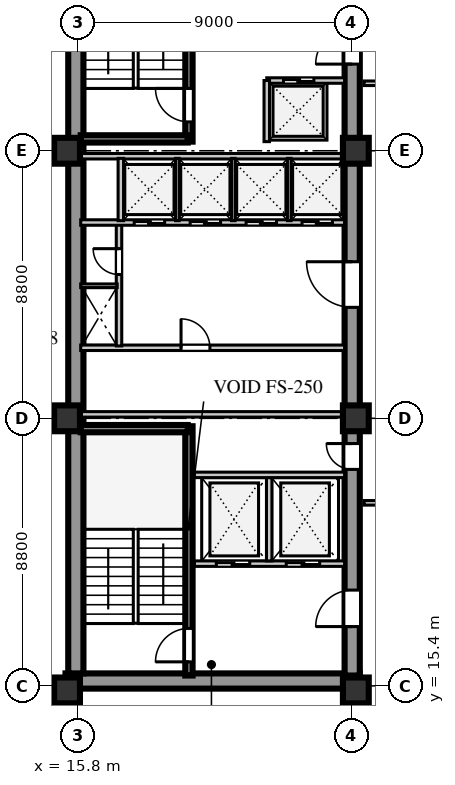
"""IFC4 building model, lengths in metres.
Left out: names, types, materials, properties, quantities, classifications, styles, units other than length and angle.
Written with IfcOpenShell. Run it as: python <this file> out.ifc"""

import sys

from ifc_helpers import new_model, si_unit, direction, frame, frame_2d, origin, origin_2d, place, context, subcontext, project, spatial, rectangle, extrude, element, fill, save


model = new_model("IFC4")
c1 = context("Model", 3, precision=1e-05, world=origin(), true_north=direction((0.0, 1.0)))
c2 = subcontext(c1, "Body", "Model", "MODEL_VIEW")
j1 = project(units=[si_unit("LENGTHUNIT", "METRE"), si_unit("PLANEANGLEUNIT", "RADIAN")], contexts=[c1])
p1 = place(None, origin())
s1 = spatial("IfcSite", under=j1, at=p1, CompositionType="ELEMENT")
p2 = place(p1, origin())
s2 = spatial("IfcBuilding", under=s1, at=p2, CompositionType="ELEMENT")
p3 = place(p2, frame((0.0, 0.0, 196.4)))
s3 = spatial("IfcBuildingStorey", under=s2, at=p3, CompositionType="ELEMENT", Elevation=196.4)
p4 = place(p3, frame((15.4, 15.56, 0.0), z_axis=(0.0, 0.0, 1.0), x_axis=(1.0, 0.0, 0.0)))
e1 = element("IfcWall", 1, at=p4, inside=s3, PredefinedType="SHEAR", context=c2, shape_type="SweptSolid", body=[
    extrude(rectangle(XDim=9.68, YDim=0.5, at=frame_2d((4.84, 0.0))), origin(), (0.0, 0.0, 1.0), 3.6),
])
p5 = place(p3, frame((15.74, 15.81, 0.0), z_axis=(0.0, 0.0, 1.0), x_axis=(0.0, 1.0, 0.0)))
e2 = element("IfcWall", 2, at=p5, inside=s3, PredefinedType="SHEAR", context=c2, shape_type="SweptSolid", body=[
    extrude(rectangle(XDim=25.63, YDim=0.5, at=frame_2d((12.815, 0.0))), origin(), (0.0, 0.0, 1.0), 3.6),
])
p6 = place(p3, frame((24.83, 15.74, 0.0), z_axis=(0.0, 0.0, 1.0), x_axis=(0.0, 1.0, 0.0)))
e3 = element("IfcWall", 3, at=p6, inside=s3, PredefinedType="SHEAR", context=c2, shape_type="SweptSolid", body=[
    extrude(rectangle(XDim=25.76, YDim=0.5, at=frame_2d((12.88, 0.0))), origin(), (0.0, 0.0, 1.0), 3.6),
])
p7 = place(p6, frame((1.61, 0.0, 0.0)))
e4 = element("IfcOpeningElement", 4, at=p7, cuts=e3, PredefinedType="OPENING", context=c2, shape_type="SweptSolid", body=[
    extrude(rectangle(XDim=1.2, YDim=2.1, at=frame_2d((0.6, 1.05))), frame((0.0, 0.26, 0.0), z_axis=(0.0, -1.0, 0.0), x_axis=(1.0, 0.0, 0.0)), (0.0, 0.0, 1.0), 0.52),
])
p8 = place(p6, frame((6.78, 0.0, 0.0)))
e5 = element("IfcOpeningElement", 5, at=p8, cuts=e3, PredefinedType="OPENING", context=c2, shape_type="SweptSolid", body=[
    extrude(rectangle(XDim=0.85, YDim=2.06, at=frame_2d((0.425, 1.03))), frame((0.0, 0.26, 0.0), z_axis=(0.0, -1.0, 0.0), x_axis=(1.0, 0.0, 0.0)), (0.0, 0.0, 1.0), 0.52),
])
p9 = place(p6, frame((12.11, 0.0, 0.0)))
e6 = element("IfcOpeningElement", 6, at=p9, cuts=e3, PredefinedType="OPENING", context=c2, shape_type="SweptSolid", body=[
    extrude(rectangle(XDim=1.5, YDim=2.12, at=frame_2d((0.75, 1.06))), frame((0.0, 0.26, 0.0), z_axis=(0.0, -1.0, 0.0), x_axis=(1.0, 0.0, 0.0)), (0.0, 0.0, 1.0), 0.52),
])
p10 = place(p6, frame((20.11, 0.0, 0.0)))
e7 = element("IfcOpeningElement", 7, at=p10, cuts=e3, PredefinedType="OPENING", context=c2, shape_type="SweptSolid", body=[
    extrude(rectangle(XDim=1.2, YDim=2.12, at=frame_2d((0.6, 1.06))), frame((0.0, 0.26, 0.0), z_axis=(0.0, -1.0, 0.0), x_axis=(1.0, 0.0, 0.0)), (0.0, 0.0, 1.0), 0.52),
])
p11 = place(p6, frame((24.01, 0.0, 0.0)))
e8 = element("IfcOpeningElement", 8, at=p11, cuts=e3, PredefinedType="OPENING", context=c2, shape_type="SweptSolid", body=[
    extrude(rectangle(XDim=0.95, YDim=2.1, at=frame_2d((0.475, 1.05))), frame((0.0, 0.26, 0.0), z_axis=(0.0, -1.0, 0.0), x_axis=(1.0, 0.0, 0.0)), (0.0, 0.0, 1.0), 0.52),
])
for number, where, z_axis, x_axis in (
    (9, (15.45, 15.25, 0.0), (0.0, 0.0, 1.0), (1.0, 0.0, 0.0)),
    (10, (15.45, 24.2, 0.0), (0.0, 0.0, 1.0), (1.0, 0.0, 0.0)),
    (11, (15.45, 33.0, 0.0), (0.0, 0.0, 1.0), (1.0, 0.0, 0.0)),
    (12, (24.95, 15.25, 0.0), (0.0, 0.0, 1.0), (1.0, 0.0, 0.0)),
    (13, (24.95, 24.2, 0.0), (0.0, 0.0, 1.0), (1.0, 0.0, 0.0)),
    (14, (24.95, 33.0, 0.0), (0.0, 0.0, 1.0), (1.0, 0.0, 0.0)),
):
    element("IfcColumn", number, at=place(p3, frame(where, z_axis=z_axis, x_axis=x_axis)), inside=s3, PredefinedType="COLUMN", context=c2, shape_type="SweptSolid", body=[
        extrude(rectangle(XDim=0.85, YDim=0.85, at=origin_2d()), origin(), (0.0, 0.0, 1.0), 3.6),
    ])
p12 = place(p3, frame((19.46, 15.74, 0.0), z_axis=(0.0, 0.0, 1.0), x_axis=(0.0, 1.0, 0.0)))
e15 = element("IfcWall", 15, at=p12, inside=s3, PredefinedType="SHEAR", context=c2, shape_type="SweptSolid", body=[
    extrude(rectangle(XDim=8.2, YDim=0.24, at=frame_2d((4.1, 0.0))), origin(), (0.0, 0.0, 1.0), 3.85),
])
p13 = place(p12, frame((0.45, 0.0, 0.0)))
e16 = element("IfcOpeningElement", 16, at=p13, cuts=e15, PredefinedType="OPENING", context=c2, shape_type="SweptSolid", body=[
    extrude(rectangle(XDim=1.1, YDim=2.1, at=frame_2d((0.55, 1.05))), frame((0.0, 0.13, 0.0), z_axis=(0.0, -1.0, 0.0), x_axis=(1.0, 0.0, 0.0)), (0.0, 0.0, 1.0), 0.26),
])
p14 = place(p3, frame((15.9, 23.86, 0.0), z_axis=(0.0, 0.0, 1.0), x_axis=(1.0, 0.0, 0.0)))
e17 = element("IfcWall", 17, at=p14, inside=s3, PredefinedType="SHEAR", context=c2, shape_type="SweptSolid", body=[
    extrude(rectangle(XDim=3.52, YDim=0.24, at=frame_2d((1.76, 0.0))), origin(), (0.0, 0.0, 1.0), 3.85),
])
p15 = place(p3, frame((19.64, 19.42, 0.0), z_axis=(0.0, 0.0, 1.0), x_axis=(1.0, 0.0, 0.0)))
e18 = element("IfcWall", 18, at=p15, inside=s3, PredefinedType="SOLIDWALL", context=c2, shape_type="SweptSolid", body=[
    extrude(rectangle(XDim=4.94, YDim=0.18, at=frame_2d((2.47, 0.0))), origin(), (0.0, 0.0, 1.0), 3.6),
])
p16 = place(p15, frame((0.72, 0.0, 0.0)))
e19 = element("IfcOpeningElement", 19, at=p16, cuts=e18, PredefinedType="OPENING", context=c2, shape_type="SweptSolid", body=[
    extrude(rectangle(XDim=1.1, YDim=2.1, at=frame_2d((0.55, 1.05))), frame((0.0, 0.1, 0.0), z_axis=(0.0, -1.0, 0.0), x_axis=(1.0, 0.0, 0.0)), (0.0, 0.0, 1.0), 0.2),
])
p17 = place(p15, frame((3.02, 0.0, 0.0)))
e20 = element("IfcOpeningElement", 20, at=p17, cuts=e18, PredefinedType="OPENING", context=c2, shape_type="SweptSolid", body=[
    extrude(rectangle(XDim=1.1, YDim=2.1, at=frame_2d((0.55, 1.05))), frame((0.0, 0.1, 0.0), z_axis=(0.0, -1.0, 0.0), x_axis=(1.0, 0.0, 0.0)), (0.0, 0.0, 1.0), 0.2),
])
p18 = place(p3, frame((22.1, 19.51, 0.0), z_axis=(0.0, 0.0, 1.0), x_axis=(0.0, 1.0, 0.0)))
e21 = element("IfcWall", 21, at=p18, inside=s3, PredefinedType="SOLIDWALL", context=c2, shape_type="SweptSolid", body=[
    extrude(rectangle(XDim=2.74, YDim=0.18, at=frame_2d((1.37, 0.0))), origin(), (0.0, 0.0, 1.0), 3.6),
])
p19 = place(p3, frame((19.64, 22.34, 0.0), z_axis=(0.0, 0.0, 1.0), x_axis=(1.0, 0.0, 0.0)))
e22 = element("IfcWall", 22, at=p19, inside=s3, PredefinedType="SOLIDWALL", context=c2, shape_type="SweptSolid", body=[
    extrude(rectangle(XDim=4.94, YDim=0.18, at=frame_2d((2.47, 0.0))), origin(), (0.0, 0.0, 1.0), 3.6),
])
p20 = place(p3, frame((15.9, 26.52, 0.0), z_axis=(0.0, 0.0, 1.0), x_axis=(1.0, 0.0, 0.0)))
e23 = element("IfcWall", 23, at=p20, inside=s3, PredefinedType="SOLIDWALL", context=c2, shape_type="SweptSolid", body=[
    extrude(rectangle(XDim=8.68, YDim=0.18, at=frame_2d((4.34, 0.0))), origin(), (0.0, 0.0, 1.0), 3.6),
])
p21 = place(p20, frame((3.3, 0.0, 0.0)))
e24 = element("IfcOpeningElement", 24, at=p21, cuts=e23, PredefinedType="OPENING", context=c2, shape_type="SweptSolid", body=[
    extrude(rectangle(XDim=0.95, YDim=2.1, at=frame_2d((0.475, 1.05))), frame((0.0, 0.1, 0.0), z_axis=(0.0, -1.0, 0.0), x_axis=(1.0, 0.0, 0.0)), (0.0, 0.0, 1.0), 0.2),
])
p22 = place(p3, frame((15.9, 24.33, 0.0), z_axis=(0.0, 0.0, 1.0), x_axis=(1.0, 0.0, 0.0)))
e25 = element("IfcWall", 25, at=p22, inside=s3, PredefinedType="SOLIDWALL", context=c2, shape_type="SweptSolid", body=[
    extrude(rectangle(XDim=8.68, YDim=0.18, at=frame_2d((4.34, 0.0))), origin(), (0.0, 0.0, 1.0), 2.95),
])
p23 = place(p3, frame((17.16, 26.58, 0.0), z_axis=(0.0, 0.0, 1.0), x_axis=(0.0, 1.0, 0.0)))
e26 = element("IfcWall", 26, at=p23, inside=s3, PredefinedType="SOLIDWALL", context=c2, shape_type="SweptSolid", body=[
    extrude(rectangle(XDim=4.02, YDim=0.18, at=frame_2d((2.01, 0.0))), origin(), (0.0, 0.0, 1.0), 3.6),
])
p24 = place(p23, frame((2.35, 0.0, 0.0)))
e27 = element("IfcOpeningElement", 27, at=p24, cuts=e26, PredefinedType="OPENING", context=c2, shape_type="SweptSolid", body=[
    extrude(rectangle(XDim=0.85, YDim=2.06, at=frame_2d((0.425, 1.03))), frame((0.0, 0.1, 0.0), z_axis=(0.0, -1.0, 0.0), x_axis=(1.0, 0.0, 0.0)), (0.0, 0.0, 1.0), 0.2),
])
p25 = place(p3, frame((15.9, 28.56, 0.0), z_axis=(0.0, 0.0, 1.0), x_axis=(1.0, 0.0, 0.0)))
e28 = element("IfcWall", 28, at=p25, inside=s3, PredefinedType="PARTITIONING", context=c2, shape_type="SweptSolid", body=[
    extrude(rectangle(XDim=1.2, YDim=0.12, at=frame_2d((0.6, 0.0))), origin(), (0.0, 0.0, 1.0), 3.6),
])
p26 = place(p3, frame((15.9, 30.64, 0.0), z_axis=(0.0, 0.0, 1.0), x_axis=(1.0, 0.0, 0.0)))
e29 = element("IfcWall", 29, at=p26, inside=s3, PredefinedType="SOLIDWALL", context=c2, shape_type="SweptSolid", body=[
    extrude(rectangle(XDim=8.68, YDim=0.18, at=frame_2d((4.34, 0.0))), origin(), (0.0, 0.0, 1.0), 3.6),
])
p27 = place(p26, frame((1.76, 0.0, 0.0)))
e30 = element("IfcOpeningElement", 30, at=p27, cuts=e29, PredefinedType="OPENING", context=c2, shape_type="SweptSolid", body=[
    extrude(rectangle(XDim=1.0, YDim=2.1, at=frame_2d((0.5, 1.05))), frame((0.0, 0.1, 0.0), z_axis=(0.0, -1.0, 0.0), x_axis=(1.0, 0.0, 0.0)), (0.0, 0.0, 1.0), 0.2),
])
p28 = place(p26, frame((3.6, 0.0, 0.0)))
e31 = element("IfcOpeningElement", 31, at=p28, cuts=e29, PredefinedType="OPENING", context=c2, shape_type="SweptSolid", body=[
    extrude(rectangle(XDim=1.0, YDim=2.1, at=frame_2d((0.5, 1.05))), frame((0.0, 0.1, 0.0), z_axis=(0.0, -1.0, 0.0), x_axis=(1.0, 0.0, 0.0)), (0.0, 0.0, 1.0), 0.2),
])
p29 = place(p26, frame((5.44, 0.0, 0.0)))
e32 = element("IfcOpeningElement", 32, at=p29, cuts=e29, PredefinedType="OPENING", context=c2, shape_type="SweptSolid", body=[
    extrude(rectangle(XDim=1.0, YDim=2.1, at=frame_2d((0.5, 1.05))), frame((0.0, 0.1, 0.0), z_axis=(0.0, -1.0, 0.0), x_axis=(1.0, 0.0, 0.0)), (0.0, 0.0, 1.0), 0.2),
])
p30 = place(p26, frame((7.28, 0.0, 0.0)))
e33 = element("IfcOpeningElement", 33, at=p30, cuts=e29, PredefinedType="OPENING", context=c2, shape_type="SweptSolid", body=[
    extrude(rectangle(XDim=1.0, YDim=2.1, at=frame_2d((0.5, 1.05))), frame((0.0, 0.1, 0.0), z_axis=(0.0, -1.0, 0.0), x_axis=(1.0, 0.0, 0.0)), (0.0, 0.0, 1.0), 0.2),
])
p31 = place(p3, frame((15.9, 32.82, 0.0), z_axis=(0.0, 0.0, 1.0), x_axis=(1.0, 0.0, 0.0)))
e34 = element("IfcWall", 34, at=p31, inside=s3, PredefinedType="SOLIDWALL", context=c2, shape_type="SweptSolid", body=[
    extrude(rectangle(XDim=8.68, YDim=0.18, at=frame_2d((4.34, 0.0))), origin(), (0.0, 0.0, 1.0), 2.95),
])
p32 = place(p3, frame((17.22, 30.7, 0.0), z_axis=(0.0, 0.0, 1.0), x_axis=(0.0, 1.0, 0.0)))
e35 = element("IfcWall", 35, at=p32, inside=s3, PredefinedType="SOLIDWALL", context=c2, shape_type="SweptSolid", body=[
    extrude(rectangle(XDim=2.05, YDim=0.18, at=frame_2d((1.025, 0.0))), origin(), (0.0, 0.0, 1.0), 3.6),
])
for number, where, z_axis, x_axis in (
    (36, (19.08, 30.7, 0.0), (0.0, 0.0, 1.0), (0.0, 1.0, 0.0)),
    (37, (20.92, 30.7, 0.0), (0.0, 0.0, 1.0), (0.0, 1.0, 0.0)),
    (38, (22.76, 30.7, 0.0), (0.0, 0.0, 1.0), (0.0, 1.0, 0.0)),
):
    element("IfcWall", number, at=place(p3, frame(where, z_axis=z_axis, x_axis=x_axis)), inside=s3, PredefinedType="PARTITIONING", context=c2, shape_type="SweptSolid", body=[
        extrude(rectangle(XDim=2.05, YDim=0.12, at=frame_2d((1.025, 0.0))), origin(), (0.0, 0.0, 1.0), 3.6),
    ])
p33 = place(p3, frame((19.46, 33.3, 0.0), z_axis=(0.0, 0.0, 1.0), x_axis=(0.0, 1.0, 0.0)))
e39 = element("IfcWall", 39, at=p33, inside=s3, PredefinedType="SHEAR", context=c2, shape_type="SweptSolid", body=[
    extrude(rectangle(XDim=8.18, YDim=0.24, at=frame_2d((4.09, 0.0))), origin(), (0.0, 0.0, 1.0), 3.85),
])
p34 = place(p33, frame((0.65, 0.0, 0.0)))
e40 = element("IfcOpeningElement", 40, at=p34, cuts=e39, PredefinedType="OPENING", context=c2, shape_type="SweptSolid", body=[
    extrude(rectangle(XDim=1.1, YDim=2.1, at=frame_2d((0.55, 1.05))), frame((0.0, 0.13, 0.0), z_axis=(0.0, -1.0, 0.0), x_axis=(1.0, 0.0, 0.0)), (0.0, 0.0, 1.0), 0.26),
])
p35 = place(p3, frame((15.9, 33.39, 0.0), z_axis=(0.0, 0.0, 1.0), x_axis=(1.0, 0.0, 0.0)))
e41 = element("IfcWall", 41, at=p35, inside=s3, PredefinedType="SHEAR", context=c2, shape_type="SweptSolid", body=[
    extrude(rectangle(XDim=3.52, YDim=0.24, at=frame_2d((1.76, 0.0))), origin(), (0.0, 0.0, 1.0), 3.85),
])
p36 = place(p3, frame((22.02, 35.31, 0.0), z_axis=(0.0, 0.0, 1.0), x_axis=(1.0, 0.0, 0.0)))
e42 = element("IfcWall", 42, at=p36, inside=s3, PredefinedType="SOLIDWALL", context=c2, shape_type="SweptSolid", body=[
    extrude(rectangle(XDim=2.56, YDim=0.18, at=frame_2d((1.28, 0.0))), origin(), (0.0, 0.0, 1.0), 3.6),
])
p37 = place(p36, frame((0.55, 0.0, 0.0)))
e43 = element("IfcOpeningElement", 43, at=p37, cuts=e42, PredefinedType="OPENING", context=c2, shape_type="SweptSolid", body=[
    extrude(rectangle(XDim=1.0, YDim=2.1, at=frame_2d((0.5, 1.05))), frame((0.0, 0.1, 0.0), z_axis=(0.0, -1.0, 0.0), x_axis=(1.0, 0.0, 0.0)), (0.0, 0.0, 1.0), 0.2),
])
p38 = place(p3, frame((22.02, 33.3, 0.0), z_axis=(0.0, 0.0, 1.0), x_axis=(0.0, 1.0, 0.0)))
e44 = element("IfcWall", 44, at=p38, inside=s3, PredefinedType="SOLIDWALL", context=c2, shape_type="SweptSolid", body=[
    extrude(rectangle(XDim=2.01, YDim=0.18, at=frame_2d((1.005, 0.0))), origin(), (0.0, 0.0, 1.0), 3.6),
])
p39 = place(p3, frame((25.22, 21.42, 0.0), z_axis=(0.0, 0.0, 1.0), x_axis=(1.0, 0.0, 0.0)))
e45 = element("IfcWall", 45, at=p39, inside=s3, PredefinedType="PARTITIONING", context=c2, shape_type="SweptSolid", body=[
    extrude(rectangle(XDim=15.6, YDim=0.15, at=frame_2d((7.8, 0.0))), origin(), (0.0, 0.0, 1.0), 3.25),
])
p40 = place(p39, frame((0.73, 0.0, 0.0)))
e46 = element("IfcOpeningElement", 46, at=p40, cuts=e45, PredefinedType="OPENING", context=c2, shape_type="SweptSolid", body=[
    extrude(rectangle(XDim=0.95, YDim=2.1, at=frame_2d((0.475, 1.05))), frame((0.0, 0.085, 0.0), z_axis=(0.0, -1.0, 0.0), x_axis=(1.0, 0.0, 0.0)), (0.0, 0.0, 1.0), 0.17),
])
p41 = place(p3, frame((25.22, 35.22, 0.0), z_axis=(0.0, 0.0, 1.0), x_axis=(1.0, 0.0, 0.0)))
e47 = element("IfcWall", 47, at=p41, inside=s3, PredefinedType="PARTITIONING", context=c2, shape_type="SweptSolid", body=[
    extrude(rectangle(XDim=9.5, YDim=0.15, at=frame_2d((4.75, 0.0))), origin(), (0.0, 0.0, 1.0), 3.6),
])
p42 = place(p41, frame((0.65, 0.0, 0.0)))
e48 = element("IfcOpeningElement", 48, at=p42, cuts=e47, PredefinedType="OPENING", context=c2, shape_type="SweptSolid", body=[
    extrude(rectangle(XDim=0.95, YDim=2.1, at=frame_2d((0.475, 1.05))), frame((0.0, 0.085, 0.0), z_axis=(0.0, -1.0, 0.0), x_axis=(1.0, 0.0, 0.0)), (0.0, 0.0, 1.0), 0.17),
])
p43 = place(p41, frame((5.2, 0.0, 0.0)))
e49 = element("IfcOpeningElement", 49, at=p43, cuts=e47, PredefinedType="OPENING", context=c2, shape_type="SweptSolid", body=[
    extrude(rectangle(XDim=0.95, YDim=2.1, at=frame_2d((0.475, 1.05))), frame((0.0, 0.085, 0.0), z_axis=(0.0, -1.0, 0.0), x_axis=(1.0, 0.0, 0.0)), (0.0, 0.0, 1.0), 0.17),
])
p44 = place(p13, origin())
e50 = element("IfcDoor", 50, at=p44, inside=s3, OperationType="SINGLE_SWING_LEFT", PredefinedType="DOOR", context=c2, shape_type="SweptSolid", body=[
    extrude(rectangle(XDim=1.1, YDim=2.1, at=frame_2d((0.55, 1.05))), frame((0.0, 0.025, 0.0), z_axis=(0.0, -1.0, 0.0), x_axis=(1.0, 0.0, 0.0)), (0.0, 0.0, 1.0), 0.05),
])
fill(e16, e50)
p45 = place(p16, origin())
e51 = element("IfcDoor", 51, at=p45, inside=s3, OperationType="DOUBLE_DOOR_SLIDING", PredefinedType="DOOR", context=c2, shape_type="SweptSolid", body=[
    extrude(rectangle(XDim=1.1, YDim=2.1, at=frame_2d((0.55, 1.05))), frame((0.0, 0.025, 0.0), z_axis=(0.0, -1.0, 0.0), x_axis=(1.0, 0.0, 0.0)), (0.0, 0.0, 1.0), 0.05),
])
fill(e19, e51)
p46 = place(p17, origin())
e52 = element("IfcDoor", 52, at=p46, inside=s3, OperationType="DOUBLE_DOOR_SLIDING", PredefinedType="DOOR", context=c2, shape_type="SweptSolid", body=[
    extrude(rectangle(XDim=1.1, YDim=2.1, at=frame_2d((0.55, 1.05))), frame((0.0, 0.025, 0.0), z_axis=(0.0, -1.0, 0.0), x_axis=(1.0, 0.0, 0.0)), (0.0, 0.0, 1.0), 0.05),
])
fill(e20, e52)
p47 = place(p7, frame((1.2, 0.0, 0.0), z_axis=(0.0, 0.0, 1.0), x_axis=(-1.0, 0.0, 0.0)))
e53 = element("IfcDoor", 53, at=p47, inside=s3, OperationType="SINGLE_SWING_RIGHT", PredefinedType="DOOR", context=c2, shape_type="SweptSolid", body=[
    extrude(rectangle(XDim=1.2, YDim=2.1, at=frame_2d((0.6, 1.05))), frame((0.0, 0.025, 0.0), z_axis=(0.0, -1.0, 0.0), x_axis=(1.0, 0.0, 0.0)), (0.0, 0.0, 1.0), 0.05),
])
fill(e4, e53)
p48 = place(p8, frame((0.85, 0.0, 0.0), z_axis=(0.0, 0.0, 1.0), x_axis=(-1.0, 0.0, 0.0)))
e54 = element("IfcDoor", 54, at=p48, inside=s3, OperationType="SINGLE_SWING_LEFT", PredefinedType="DOOR", context=c2, shape_type="SweptSolid", body=[
    extrude(rectangle(XDim=0.85, YDim=2.06, at=frame_2d((0.425, 1.03))), frame((0.0, 0.025, 0.0), z_axis=(0.0, -1.0, 0.0), x_axis=(1.0, 0.0, 0.0)), (0.0, 0.0, 1.0), 0.05),
])
fill(e5, e54)
p49 = place(p21, origin())
e55 = element("IfcDoor", 55, at=p49, inside=s3, OperationType="SINGLE_SWING_LEFT", PredefinedType="DOOR", context=c2, shape_type="SweptSolid", body=[
    extrude(rectangle(XDim=0.95, YDim=2.1, at=frame_2d((0.475, 1.05))), frame((0.0, 0.025, 0.0), z_axis=(0.0, -1.0, 0.0), x_axis=(1.0, 0.0, 0.0)), (0.0, 0.0, 1.0), 0.05),
])
fill(e24, e55)
p50 = place(p24, origin())
e56 = element("IfcDoor", 56, at=p50, inside=s3, OperationType="SINGLE_SWING_RIGHT", PredefinedType="DOOR", context=c2, shape_type="SweptSolid", body=[
    extrude(rectangle(XDim=0.85, YDim=2.06, at=frame_2d((0.425, 1.03))), frame((0.0, 0.025, 0.0), z_axis=(0.0, -1.0, 0.0), x_axis=(1.0, 0.0, 0.0)), (0.0, 0.0, 1.0), 0.05),
])
fill(e27, e56)
p51 = place(p9, frame((1.5, 0.0, 0.0), z_axis=(0.0, 0.0, 1.0), x_axis=(-1.0, 0.0, 0.0)))
e57 = element("IfcDoor", 57, at=p51, inside=s3, OperationType="SINGLE_SWING_LEFT", PredefinedType="DOOR", context=c2, shape_type="SweptSolid", body=[
    extrude(rectangle(XDim=1.5, YDim=2.12, at=frame_2d((0.75, 1.06))), frame((0.0, 0.025, 0.0), z_axis=(0.0, -1.0, 0.0), x_axis=(1.0, 0.0, 0.0)), (0.0, 0.0, 1.0), 0.05),
])
fill(e6, e57)
p52 = place(p27, frame((1.0, 0.0, 0.0), z_axis=(0.0, 0.0, 1.0), x_axis=(-1.0, 0.0, 0.0)))
e58 = element("IfcDoor", 58, at=p52, inside=s3, OperationType="DOUBLE_DOOR_SLIDING", PredefinedType="DOOR", context=c2, shape_type="SweptSolid", body=[
    extrude(rectangle(XDim=1.0, YDim=2.1, at=frame_2d((0.5, 1.05))), frame((0.0, 0.025, 0.0), z_axis=(0.0, -1.0, 0.0), x_axis=(1.0, 0.0, 0.0)), (0.0, 0.0, 1.0), 0.05),
])
fill(e30, e58)
p53 = place(p28, frame((1.0, 0.0, 0.0), z_axis=(0.0, 0.0, 1.0), x_axis=(-1.0, 0.0, 0.0)))
e59 = element("IfcDoor", 59, at=p53, inside=s3, OperationType="DOUBLE_DOOR_SLIDING", PredefinedType="DOOR", context=c2, shape_type="SweptSolid", body=[
    extrude(rectangle(XDim=1.0, YDim=2.1, at=frame_2d((0.5, 1.05))), frame((0.0, 0.025, 0.0), z_axis=(0.0, -1.0, 0.0), x_axis=(1.0, 0.0, 0.0)), (0.0, 0.0, 1.0), 0.05),
])
fill(e31, e59)
p54 = place(p29, frame((1.0, 0.0, 0.0), z_axis=(0.0, 0.0, 1.0), x_axis=(-1.0, 0.0, 0.0)))
e60 = element("IfcDoor", 60, at=p54, inside=s3, OperationType="DOUBLE_DOOR_SLIDING", PredefinedType="DOOR", context=c2, shape_type="SweptSolid", body=[
    extrude(rectangle(XDim=1.0, YDim=2.1, at=frame_2d((0.5, 1.05))), frame((0.0, 0.025, 0.0), z_axis=(0.0, -1.0, 0.0), x_axis=(1.0, 0.0, 0.0)), (0.0, 0.0, 1.0), 0.05),
])
fill(e32, e60)
p55 = place(p30, frame((1.0, 0.0, 0.0), z_axis=(0.0, 0.0, 1.0), x_axis=(-1.0, 0.0, 0.0)))
e61 = element("IfcDoor", 61, at=p55, inside=s3, OperationType="DOUBLE_DOOR_SLIDING", PredefinedType="DOOR", context=c2, shape_type="SweptSolid", body=[
    extrude(rectangle(XDim=1.0, YDim=2.1, at=frame_2d((0.5, 1.05))), frame((0.0, 0.025, 0.0), z_axis=(0.0, -1.0, 0.0), x_axis=(1.0, 0.0, 0.0)), (0.0, 0.0, 1.0), 0.05),
])
fill(e33, e61)
p56 = place(p34, origin())
e62 = element("IfcDoor", 62, at=p56, inside=s3, OperationType="SINGLE_SWING_RIGHT", PredefinedType="DOOR", context=c2, shape_type="SweptSolid", body=[
    extrude(rectangle(XDim=1.1, YDim=2.1, at=frame_2d((0.55, 1.05))), frame((0.0, 0.025, 0.0), z_axis=(0.0, -1.0, 0.0), x_axis=(1.0, 0.0, 0.0)), (0.0, 0.0, 1.0), 0.05),
])
fill(e40, e62)
p57 = place(p10, frame((1.2, 0.0, 0.0), z_axis=(0.0, 0.0, 1.0), x_axis=(-1.0, 0.0, 0.0)))
e63 = element("IfcDoor", 63, at=p57, inside=s3, OperationType="SINGLE_SWING_RIGHT", PredefinedType="DOOR", context=c2, shape_type="SweptSolid", body=[
    extrude(rectangle(XDim=1.2, YDim=2.12, at=frame_2d((0.6, 1.06))), frame((0.0, 0.025, 0.0), z_axis=(0.0, -1.0, 0.0), x_axis=(1.0, 0.0, 0.0)), (0.0, 0.0, 1.0), 0.05),
])
fill(e7, e63)
p58 = place(p37, origin())
e64 = element("IfcDoor", 64, at=p58, inside=s3, OperationType="DOUBLE_DOOR_SLIDING", PredefinedType="DOOR", context=c2, shape_type="SweptSolid", body=[
    extrude(rectangle(XDim=1.0, YDim=2.1, at=frame_2d((0.5, 1.05))), frame((0.0, 0.025, 0.0), z_axis=(0.0, -1.0, 0.0), x_axis=(1.0, 0.0, 0.0)), (0.0, 0.0, 1.0), 0.05),
])
fill(e43, e64)
save(model, sys.argv[1])
